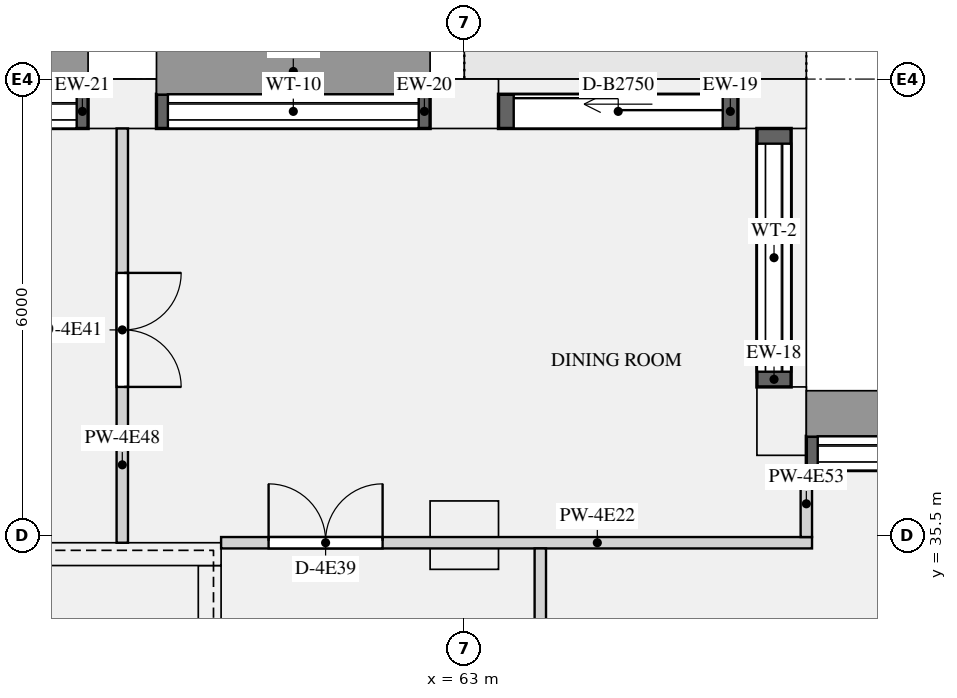
"""IFC4 building model, lengths in metres.
Left out: names, types, materials, properties, quantities, classifications, styles, units other than length and angle.
Written with IfcOpenShell. Run it as: python <this file> out.ifc"""

import sys

from ifc_helpers import new_model, si_unit, direction, frame, frame_2d, origin, origin_2d, place, context, subcontext, project, spatial, rectangle, extrude, element, fill, save


model = new_model("IFC4")
c1 = context("Model", 3, precision=1e-05, world=origin(), true_north=direction((0.0, 1.0)))
c2 = subcontext(c1, "Body", "Model", "MODEL_VIEW")
j1 = project(units=[si_unit("LENGTHUNIT", "METRE"), si_unit("PLANEANGLEUNIT", "RADIAN")], contexts=[c1])
p1 = place(None, origin())
s1 = spatial("IfcSite", under=j1, at=p1, CompositionType="ELEMENT")
p2 = place(p1, origin())
s2 = spatial("IfcBuilding", under=s1, at=p2, CompositionType="ELEMENT")
p3 = place(p2, frame((0.0, 0.0, 229.5)))
s3 = spatial("IfcBuildingStorey", under=s2, at=p3, CompositionType="ELEMENT", Elevation=229.5)
for number, where, z_axis, x_axis in (
    (1, (67.175, 37.0, 0.0), (0.0, 0.0, 1.0), (0.0, 1.0, 0.0)),
    (2, (67.05, 41.175, 0.0), (0.0, 0.0, 1.0), (-1.0, 0.0, 0.0)),
    (3, (63.0, 41.175, 0.0), (0.0, 0.0, 1.0), (-1.0, 0.0, 0.0)),
    (4, (58.5, 41.175, 0.0), (0.0, 0.0, 1.0), (-1.0, 0.0, 0.0)),
):
    element("IfcColumn", number, at=place(p3, frame(where, z_axis=z_axis, x_axis=x_axis)), inside=s3, PredefinedType="USERDEFINED", context=c2, shape_type="SweptSolid", body=[
        extrude(rectangle(XDim=0.9, YDim=0.65, at=origin_2d()), origin(), (0.0, 0.0, 1.0), 3.15),
    ])
p4 = place(p3, frame((63.0, 35.5, 0.0), z_axis=(0.0, 0.0, 1.0), x_axis=(1.0, 0.0, 0.0)))
e5 = element("IfcColumn", 5, at=p4, inside=s3, PredefinedType="COLUMN", context=c2, shape_type="SweptSolid", body=[
    extrude(rectangle(XDim=0.9, YDim=0.9, at=origin_2d()), origin(), (0.0, 0.0, 1.0), 3.15),
])
p5 = place(p3, frame((56.2, 35.25, 0.0), z_axis=(0.0, 0.0, 1.0), x_axis=(1.0, 0.0, 0.0)))
e6 = element("IfcWall", 6, at=p5, inside=s3, PredefinedType="SHEAR", context=c2, shape_type="SweptSolid", body=[
    extrude(rectangle(XDim=3.6, YDim=0.3, at=frame_2d((1.8, 0.0))), origin(), (0.0, 0.0, 1.0), 3.15),
])
p6 = place(p3, frame((59.65, 27.3, 0.0), z_axis=(0.0, 0.0, 1.0), x_axis=(0.0, 1.0, 0.0)))
e7 = element("IfcWall", 7, at=p6, inside=s3, PredefinedType="SHEAR", context=c2, shape_type="SweptSolid", body=[
    extrude(rectangle(XDim=7.8, YDim=0.3, at=frame_2d((3.9, 0.0))), origin(), (0.0, 0.0, 1.0), 3.15),
])
p7 = place(p3, frame((71.1, 36.575, 0.9), z_axis=(0.0, 0.0, 1.0), x_axis=(-1.0, 0.0, 0.0)))
e8 = element("IfcWall", 8, at=p7, inside=s3, PredefinedType="SOLIDWALL", context=c2, shape_type="SweptSolid", body=[
    extrude(rectangle(XDim=3.6, YDim=0.45, at=frame_2d((1.8, 0.0))), origin(), (0.0, 0.0, 1.0), 1.93),
])
p8 = place(p7, frame((0.15, 0.0, 0.15)))
e9 = element("IfcOpeningElement", 9, at=p8, cuts=e8, PredefinedType="OPENING", context=c2, shape_type="SweptSolid", body=[
    extrude(rectangle(XDim=3.3, YDim=1.5, at=frame_2d((1.65, 0.75))), frame((0.0, 0.235, 0.0), z_axis=(0.0, -1.0, 0.0), x_axis=(1.0, 0.0, 0.0)), (0.0, 0.0, 1.0), 0.47),
])
p9 = place(p3, frame((67.075, 37.45, 0.9), z_axis=(0.0, 0.0, 1.0), x_axis=(0.0, 1.0, 0.0)))
e10 = element("IfcWall", 10, at=p9, inside=s3, PredefinedType="SOLIDWALL", context=c2, shape_type="SweptSolid", body=[
    extrude(rectangle(XDim=3.4, YDim=0.45, at=frame_2d((1.7, 0.0))), origin(), (0.0, 0.0, 1.0), 1.93),
])
p10 = place(p9, frame((0.2, 0.0, 0.15)))
e11 = element("IfcOpeningElement", 11, at=p10, cuts=e10, PredefinedType="OPENING", context=c2, shape_type="SweptSolid", body=[
    extrude(rectangle(XDim=3.0, YDim=1.5, at=frame_2d((1.5, 0.75))), frame((0.0, 0.235, 0.0), z_axis=(0.0, -1.0, 0.0), x_axis=(1.0, 0.0, 0.0)), (0.0, 0.0, 1.0), 0.47),
])
p11 = place(p3, frame((66.6, 41.075, 0.0), z_axis=(0.0, 0.0, 1.0), x_axis=(-1.0, 0.0, 0.0)))
e12 = element("IfcWall", 12, at=p11, inside=s3, PredefinedType="SOLIDWALL", context=c2, shape_type="SweptSolid", body=[
    extrude(rectangle(XDim=3.15, YDim=0.45, at=frame_2d((1.575, 0.0))), origin(), (0.0, 0.0, 1.0), 2.83),
])
p12 = place(p11, frame((0.2, 0.0, 0.0)))
e13 = element("IfcOpeningElement", 13, at=p12, cuts=e12, PredefinedType="OPENING", context=c2, shape_type="SweptSolid", body=[
    extrude(rectangle(XDim=2.75, YDim=2.3, at=frame_2d((1.375, 1.15))), frame((0.0, 0.235, 0.0), z_axis=(0.0, -1.0, 0.0), x_axis=(1.0, 0.0, 0.0)), (0.0, 0.0, 1.0), 0.47),
])
p13 = place(p3, frame((62.55, 41.075, 0.9), z_axis=(0.0, 0.0, 1.0), x_axis=(-1.0, 0.0, 0.0)))
e14 = element("IfcWall", 14, at=p13, inside=s3, PredefinedType="SOLIDWALL", context=c2, shape_type="SweptSolid", body=[
    extrude(rectangle(XDim=3.6, YDim=0.45, at=frame_2d((1.8, 0.0))), origin(), (0.0, 0.0, 1.0), 1.93),
])
p14 = place(p13, frame((0.15, 0.0, 0.15)))
e15 = element("IfcOpeningElement", 15, at=p14, cuts=e14, PredefinedType="OPENING", context=c2, shape_type="SweptSolid", body=[
    extrude(rectangle(XDim=3.3, YDim=1.5, at=frame_2d((1.65, 0.75))), frame((0.0, 0.235, 0.0), z_axis=(0.0, -1.0, 0.0), x_axis=(1.0, 0.0, 0.0)), (0.0, 0.0, 1.0), 0.47),
])
p15 = place(p3, frame((58.05, 41.075, 0.9), z_axis=(0.0, 0.0, 1.0), x_axis=(-1.0, 0.0, 0.0)))
e16 = element("IfcWall", 16, at=p15, inside=s3, PredefinedType="SOLIDWALL", context=c2, shape_type="SweptSolid", body=[
    extrude(rectangle(XDim=3.6, YDim=0.45, at=frame_2d((1.8, 0.0))), origin(), (0.0, 0.0, 1.0), 1.93),
])
p16 = place(p15, frame((0.15, 0.0, 0.15)))
e17 = element("IfcOpeningElement", 17, at=p16, cuts=e16, PredefinedType="OPENING", context=c2, shape_type="SweptSolid", body=[
    extrude(rectangle(XDim=3.3, YDim=1.5, at=frame_2d((1.65, 0.75))), frame((0.0, 0.235, 0.0), z_axis=(0.0, -1.0, 0.0), x_axis=(1.0, 0.0, 0.0)), (0.0, 0.0, 1.0), 0.47),
])
p17 = place(p3, frame((59.8, 35.4, 0.0), z_axis=(0.0, 0.0, 1.0), x_axis=(1.0, 0.0, 0.0)))
e18 = element("IfcWall", 18, at=p17, inside=s3, PredefinedType="PARTITIONING", context=c2, shape_type="SweptSolid", body=[
    extrude(rectangle(XDim=7.775, YDim=0.15, at=frame_2d((3.887, 0.0))), origin(), (0.0, 0.0, 1.0), 2.83),
])
p18 = place(p17, frame((0.625, 0.0, 0.0)))
e19 = element("IfcOpeningElement", 19, at=p18, cuts=e18, PredefinedType="OPENING", context=c2, shape_type="SweptSolid", body=[
    extrude(rectangle(XDim=1.5, YDim=2.1, at=frame_2d((0.75, 1.05))), frame((0.0, 0.085, 0.0), z_axis=(0.0, -1.0, 0.0), x_axis=(1.0, 0.0, 0.0)), (0.0, 0.0, 1.0), 0.17),
])
p19 = place(p3, frame((58.5, 35.4, 0.0), z_axis=(0.0, 0.0, 1.0), x_axis=(0.0, 1.0, 0.0)))
e20 = element("IfcWall", 20, at=p19, inside=s3, PredefinedType="PARTITIONING", context=c2, shape_type="SweptSolid", body=[
    extrude(rectangle(XDim=5.45, YDim=0.15, at=frame_2d((2.725, 0.0))), origin(), (0.0, 0.0, 1.0), 2.83),
])
p20 = place(p19, frame((2.05, 0.0, 0.0)))
e21 = element("IfcOpeningElement", 21, at=p20, cuts=e20, PredefinedType="OPENING", context=c2, shape_type="SweptSolid", body=[
    extrude(rectangle(XDim=1.5, YDim=2.1, at=frame_2d((0.75, 1.05))), frame((0.0, 0.085, 0.0), z_axis=(0.0, -1.0, 0.0), x_axis=(1.0, 0.0, 0.0)), (0.0, 0.0, 1.0), 0.17),
])
p21 = place(p3, frame((64.0, 28.575, 0.0), z_axis=(0.0, 0.0, 1.0), x_axis=(0.0, 1.0, 0.0)))
e22 = element("IfcWall", 22, at=p21, inside=s3, PredefinedType="PARTITIONING", context=c2, shape_type="SweptSolid", body=[
    extrude(rectangle(XDim=6.75, YDim=0.15, at=frame_2d((3.375, 0.0))), origin(), (0.0, 0.0, 1.0), 2.83),
])
p22 = place(p21, frame((1.6, 0.0, 0.0)))
e23 = element("IfcOpeningElement", 23, at=p22, cuts=e22, PredefinedType="OPENING", context=c2, shape_type="SweptSolid", body=[
    extrude(rectangle(XDim=0.9, YDim=2.1, at=frame_2d((0.45, 1.05))), frame((0.0, 0.085, 0.0), z_axis=(0.0, -1.0, 0.0), x_axis=(1.0, 0.0, 0.0)), (0.0, 0.0, 1.0), 0.17),
])
p23 = place(p3, frame((67.5, 35.475, 0.0), z_axis=(0.0, 0.0, 1.0), x_axis=(0.0, 1.0, 0.0)))
e24 = element("IfcWall", 24, at=p23, inside=s3, PredefinedType="PARTITIONING", context=c2, shape_type="SweptSolid", body=[
    extrude(rectangle(XDim=0.875, YDim=0.15, at=frame_2d((0.438, 0.0))), origin(), (0.0, 0.0, 1.0), 2.83),
])
p24 = place(p8, origin())
e25 = element("IfcWindow", 25, at=p24, inside=s3, PartitioningType="SINGLE_PANEL", PredefinedType="WINDOW", context=c2, shape_type="SweptSolid", body=[
    extrude(rectangle(XDim=3.3, YDim=1.5, at=frame_2d((1.65, 0.75))), frame((0.0, -0.065, 0.0), z_axis=(0.0, -1.0, 0.0), x_axis=(1.0, 0.0, 0.0)), (0.0, 0.0, 1.0), 0.06),
])
fill(e9, e25)
p25 = place(p10, origin())
e26 = element("IfcWindow", 26, at=p25, inside=s3, PartitioningType="SINGLE_PANEL", PredefinedType="WINDOW", context=c2, shape_type="SweptSolid", body=[
    extrude(rectangle(XDim=3.0, YDim=1.5, at=frame_2d((1.5, 0.75))), frame((0.0, -0.065, 0.0), z_axis=(0.0, -1.0, 0.0), x_axis=(1.0, 0.0, 0.0)), (0.0, 0.0, 1.0), 0.06),
])
fill(e11, e26)
p26 = place(p12, origin())
e27 = element("IfcDoor", 27, at=p26, inside=s3, OperationType="SLIDING_TO_LEFT", PredefinedType="DOOR", context=c2, shape_type="SweptSolid", body=[
    extrude(rectangle(XDim=2.75, YDim=2.3, at=frame_2d((1.375, 1.15))), frame((0.0, -0.07, 0.0), z_axis=(0.0, -1.0, 0.0), x_axis=(1.0, 0.0, 0.0)), (0.0, 0.0, 1.0), 0.05),
])
fill(e13, e27)
p27 = place(p14, origin())
e28 = element("IfcWindow", 28, at=p27, inside=s3, PartitioningType="SINGLE_PANEL", PredefinedType="WINDOW", context=c2, shape_type="SweptSolid", body=[
    extrude(rectangle(XDim=3.3, YDim=1.5, at=frame_2d((1.65, 0.75))), frame((0.0, -0.065, 0.0), z_axis=(0.0, -1.0, 0.0), x_axis=(1.0, 0.0, 0.0)), (0.0, 0.0, 1.0), 0.06),
])
fill(e15, e28)
p28 = place(p16, origin())
e29 = element("IfcWindow", 29, at=p28, inside=s3, PartitioningType="SINGLE_PANEL", PredefinedType="WINDOW", context=c2, shape_type="SweptSolid", body=[
    extrude(rectangle(XDim=3.3, YDim=1.5, at=frame_2d((1.65, 0.75))), frame((0.0, -0.065, 0.0), z_axis=(0.0, -1.0, 0.0), x_axis=(1.0, 0.0, 0.0)), (0.0, 0.0, 1.0), 0.06),
])
fill(e17, e29)
p29 = place(p18, origin())
e30 = element("IfcDoor", 30, at=p29, inside=s3, OperationType="DOUBLE_DOOR_SINGLE_SWING", PredefinedType="DOOR", context=c2, shape_type="SweptSolid", body=[
    extrude(rectangle(XDim=1.5, YDim=2.1, at=frame_2d((0.75, 1.05))), frame((0.0, 0.025, 0.0), z_axis=(0.0, -1.0, 0.0), x_axis=(1.0, 0.0, 0.0)), (0.0, 0.0, 1.0), 0.05),
])
fill(e19, e30)
p30 = place(p20, frame((1.5, 0.0, 0.0), z_axis=(0.0, 0.0, 1.0), x_axis=(-1.0, 0.0, 0.0)))
e31 = element("IfcDoor", 31, at=p30, inside=s3, OperationType="DOUBLE_DOOR_SINGLE_SWING", PredefinedType="DOOR", context=c2, shape_type="SweptSolid", body=[
    extrude(rectangle(XDim=1.5, YDim=2.1, at=frame_2d((0.75, 1.05))), frame((0.0, 0.025, 0.0), z_axis=(0.0, -1.0, 0.0), x_axis=(1.0, 0.0, 0.0)), (0.0, 0.0, 1.0), 0.05),
])
fill(e21, e31)
save(model, sys.argv[1])
